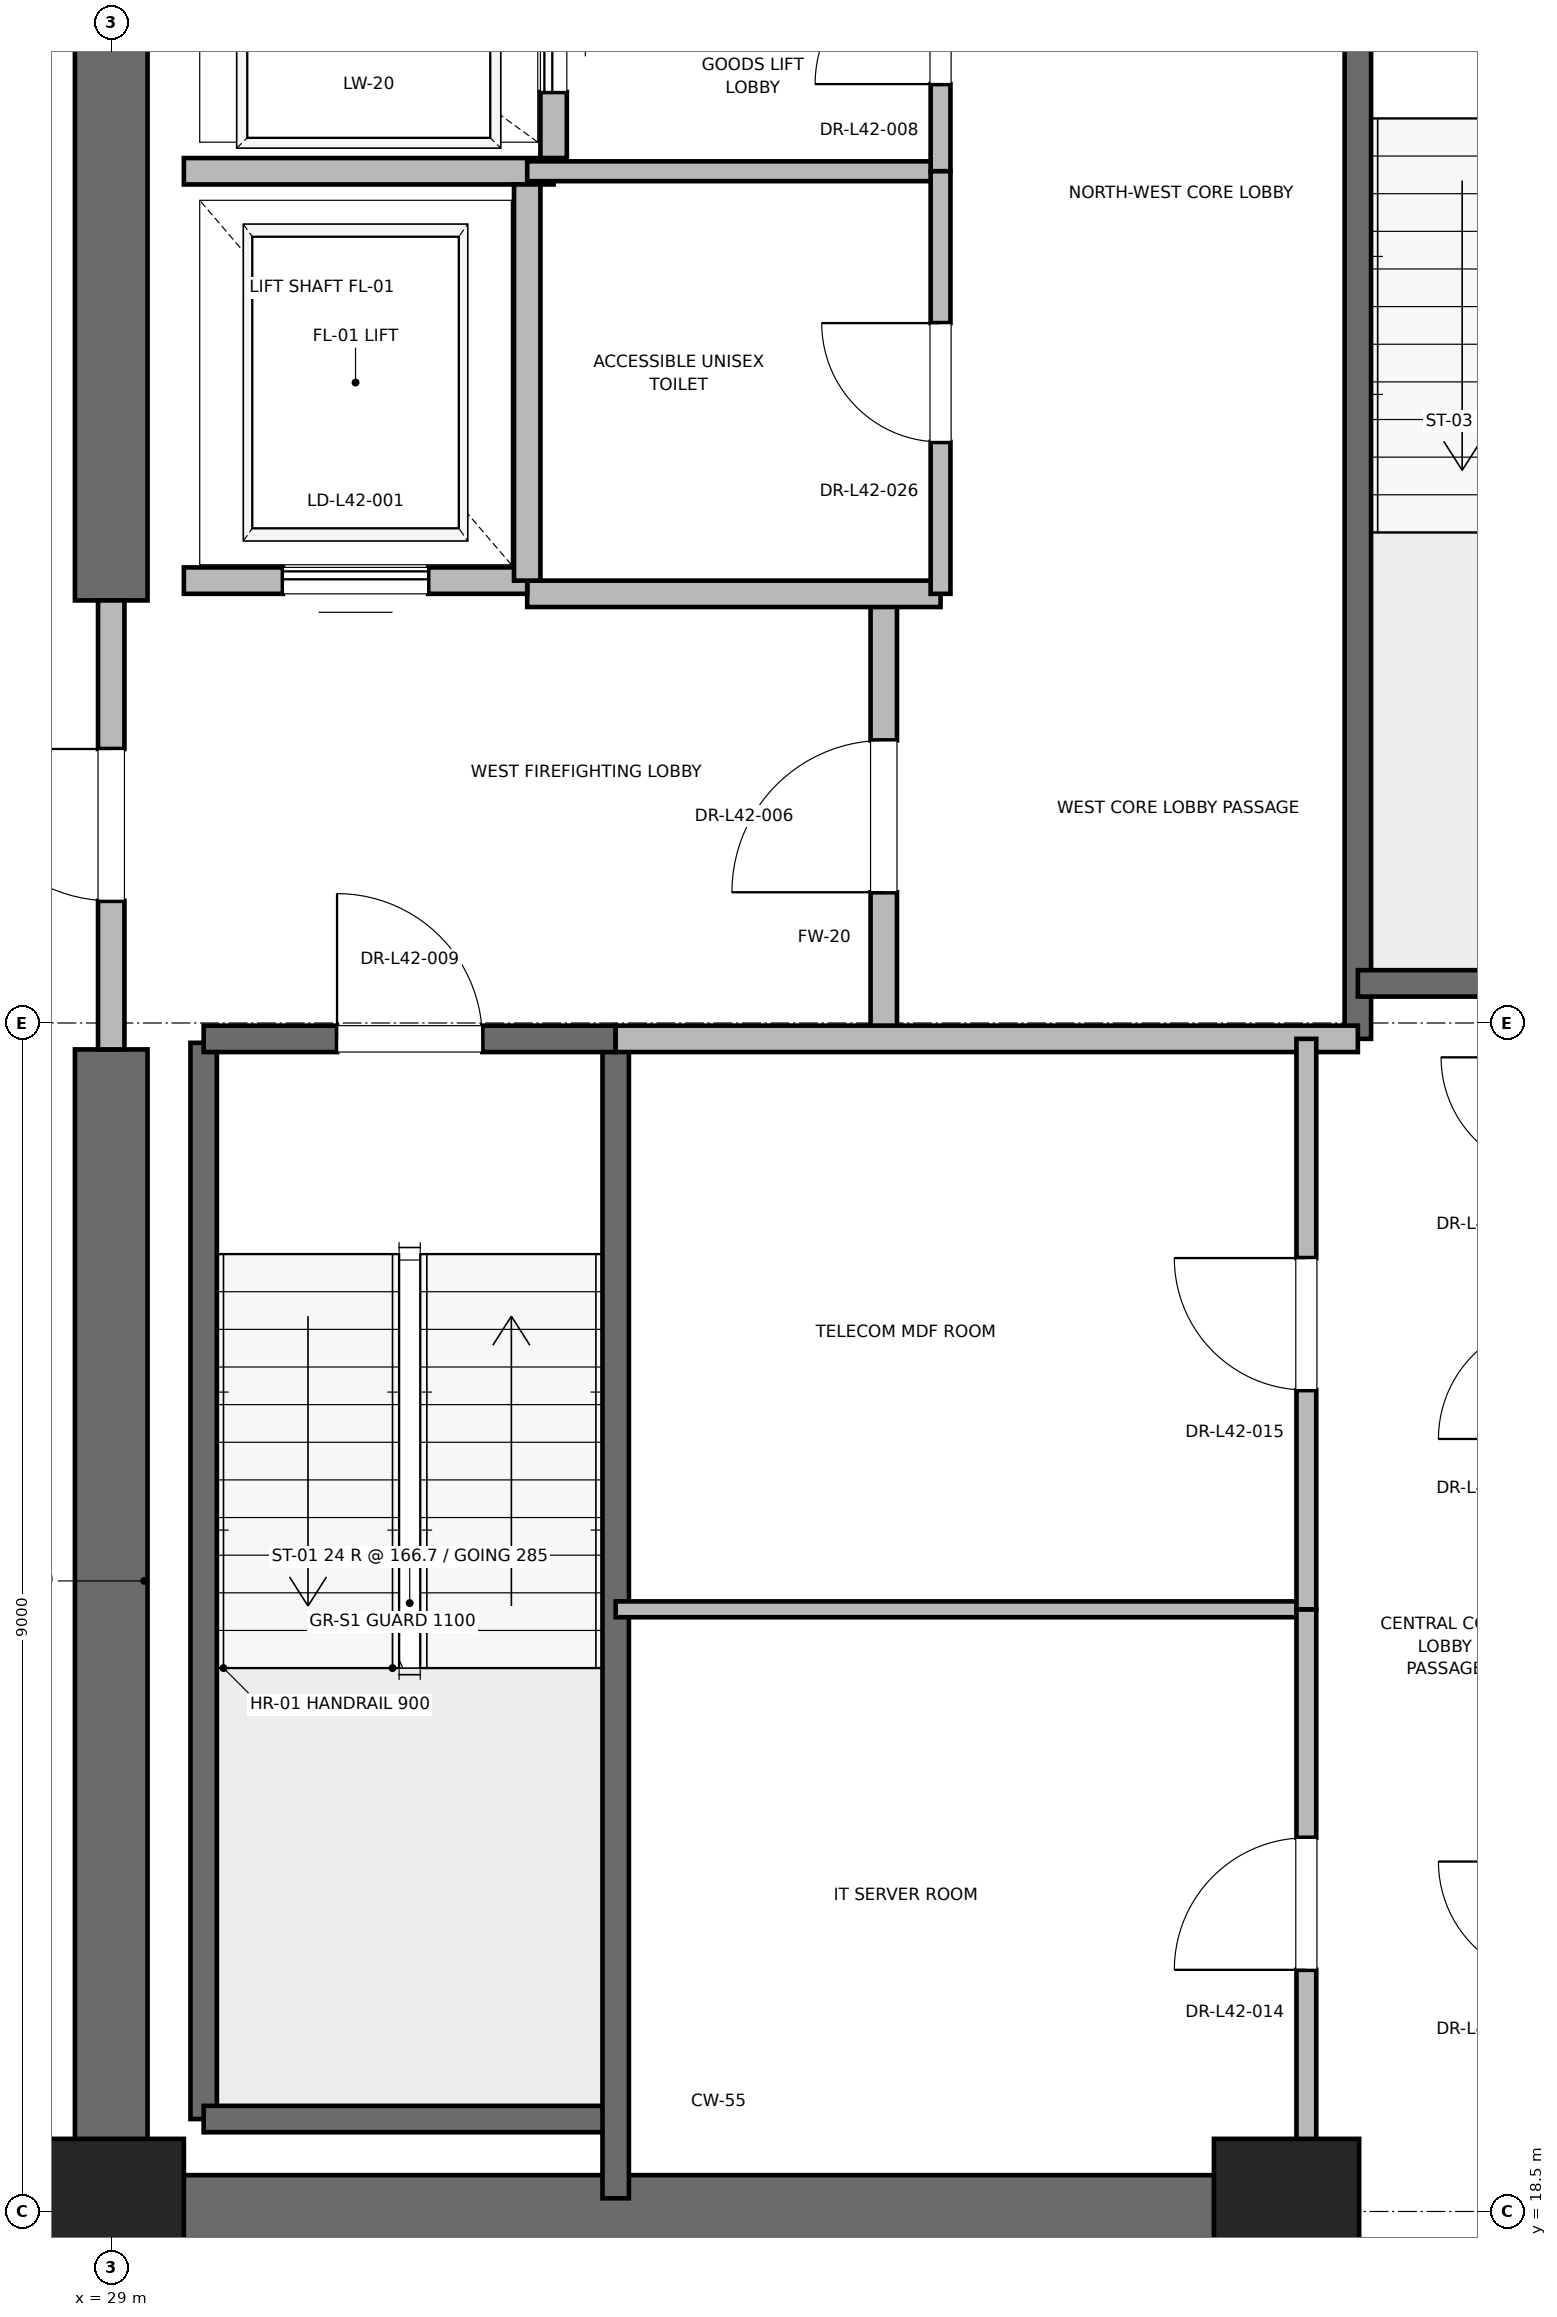
"""IFC4 building model, lengths in metres.
Left out: names, types, materials, properties, quantities, classifications, styles, units other than length and angle.
Written with IfcOpenShell. Run it as: python <this file> out.ifc"""

import sys

from ifc_helpers import new_model, si_unit, direction, frame, frame_2d, origin, origin_2d, place, context, subcontext, project, spatial, rectangle, extrude, element, fill, save


model = new_model("IFC4")
c1 = context("Model", 3, precision=1e-05, world=origin(), true_north=direction((0.0, 1.0)))
c2 = subcontext(c1, "Body", "Model", "MODEL_VIEW")
j1 = project(units=[si_unit("LENGTHUNIT", "METRE"), si_unit("PLANEANGLEUNIT", "RADIAN")], contexts=[c1])
p1 = place(None, origin())
s1 = spatial("IfcSite", under=j1, at=p1, CompositionType="ELEMENT")
p2 = place(p1, origin())
s2 = spatial("IfcBuilding", under=s1, at=p2, CompositionType="ELEMENT")
p3 = place(p2, frame((0.0, 0.0, 180.4)))
s3 = spatial("IfcBuildingStorey", under=s2, at=p3, CompositionType="ELEMENT", Elevation=180.4)
for number, where, z_axis, x_axis in (
    (1, (29.0, 18.5, 0.0), (0.0, 0.0, 1.0), (1.0, 0.0, 0.0)),
    (2, (37.9, 18.5, 0.0), (0.0, 0.0, 1.0), (1.0, 0.0, 0.0)),
):
    element("IfcColumn", number, at=place(p3, frame(where, z_axis=z_axis, x_axis=x_axis)), inside=s3, PredefinedType="PILASTER", context=c2, shape_type="SweptSolid", body=[
        extrude(rectangle(XDim=1.1, YDim=1.1, at=origin_2d()), origin(), (0.0, 0.0, 1.0), 4.0),
    ])
p4 = place(p3, frame((29.0, 18.5, 0.0), z_axis=(0.0, 0.0, 1.0), x_axis=(1.0, 0.0, 0.0)))
e3 = element("IfcWall", 3, at=p4, inside=s3, PredefinedType="SHEAR", context=c2, shape_type="SweptSolid", body=[
    extrude(rectangle(XDim=9.2, YDim=0.55, at=frame_2d((4.6, 0.0))), origin(), (0.0, 0.0, 1.0), 3.7),
])
p5 = place(p3, frame((29.0, 18.5, 0.0), z_axis=(0.0, 0.0, 1.0), x_axis=(0.0, 1.0, 0.0)))
e4 = element("IfcWall", 4, at=p5, inside=s3, PredefinedType="SHEAR", context=c2, shape_type="SweptSolid", body=[
    extrude(rectangle(XDim=8.8, YDim=0.55, at=frame_2d((4.4, 0.0))), origin(), (0.0, 0.0, 1.0), 3.7),
])
p6 = place(p3, frame((29.0, 30.7, 0.0), z_axis=(0.0, 0.0, 1.0), x_axis=(0.0, 1.0, 0.0)))
e5 = element("IfcWall", 5, at=p6, inside=s3, PredefinedType="SHEAR", context=c2, shape_type="SweptSolid", body=[
    extrude(rectangle(XDim=5.8, YDim=0.55, at=frame_2d((2.9, 0.0))), origin(), (0.0, 0.0, 1.0), 3.7),
])
p7 = place(p3, frame((29.7, 19.2, 0.0), z_axis=(0.0, 0.0, 1.0), x_axis=(0.0, 1.0, 0.0)))
e6 = element("IfcWall", 6, at=p7, inside=s3, PredefinedType="SOLIDWALL", context=c2, shape_type="SweptSolid", body=[
    extrude(rectangle(XDim=8.15, YDim=0.2, at=frame_2d((4.075, 0.0))), origin(), (0.0, 0.0, 1.0), 3.7),
])
p8 = place(p3, frame((29.7, 19.2, 0.0), z_axis=(0.0, 0.0, 1.0), x_axis=(1.0, 0.0, 0.0)))
e7 = element("IfcWall", 7, at=p8, inside=s3, PredefinedType="SOLIDWALL", context=c2, shape_type="SweptSolid", body=[
    extrude(rectangle(XDim=3.12, YDim=0.2, at=frame_2d((1.56, 0.0))), origin(), (0.0, 0.0, 1.0), 3.7),
])
p9 = place(p3, frame((32.82, 18.6, 0.0), z_axis=(0.0, 0.0, 1.0), x_axis=(0.0, 1.0, 0.0)))
e8 = element("IfcWall", 8, at=p9, inside=s3, PredefinedType="SOLIDWALL", context=c2, shape_type="SweptSolid", body=[
    extrude(rectangle(XDim=8.78, YDim=0.2, at=frame_2d((4.39, 0.0))), origin(), (0.0, 0.0, 1.0), 3.7),
])
p10 = place(p3, frame((29.7, 27.38, 0.0), z_axis=(0.0, 0.0, 1.0), x_axis=(1.0, 0.0, 0.0)))
e9 = element("IfcWall", 9, at=p10, inside=s3, PredefinedType="SOLIDWALL", context=c2, shape_type="SweptSolid", body=[
    extrude(rectangle(XDim=3.12, YDim=0.2, at=frame_2d((1.56, 0.0))), origin(), (0.0, 0.0, 1.0), 3.7),
])
p11 = place(p10, frame((1.01, 0.0, 0.0)))
e10 = element("IfcOpeningElement", 10, at=p11, cuts=e9, PredefinedType="OPENING", context=c2, shape_type="SweptSolid", body=[
    extrude(rectangle(XDim=1.1, YDim=2.15, at=frame_2d((0.55, 1.075))), frame((0.0, 0.1, 0.0), z_axis=(0.0, -1.0, 0.0), x_axis=(1.0, 0.0, 0.0)), (0.0, 0.0, 1.0), 0.2),
])
p12 = place(p3, frame((38.44, 27.38, 0.0), z_axis=(0.0, 0.0, 1.0), x_axis=(0.0, 1.0, 0.0)))
e11 = element("IfcWall", 11, at=p12, inside=s3, PredefinedType="SOLIDWALL", context=c2, shape_type="SweptSolid", body=[
    extrude(rectangle(XDim=8.87, YDim=0.2, at=frame_2d((4.435, 0.0))), origin(), (0.0, 0.0, 1.0), 3.7),
])
p13 = place(p3, frame((38.44, 27.8, 0.0), z_axis=(0.0, 0.0, 1.0), x_axis=(1.0, 0.0, 0.0)))
e12 = element("IfcWall", 12, at=p13, inside=s3, PredefinedType="SOLIDWALL", context=c2, shape_type="SweptSolid", body=[
    extrude(rectangle(XDim=3.32, YDim=0.2, at=frame_2d((1.66, 0.0))), origin(), (0.0, 0.0, 1.0), 3.7),
])
p14 = place(p3, frame((34.85, 27.38, 0.0), z_axis=(0.0, 0.0, 1.0), x_axis=(0.0, 1.0, 0.0)))
e13 = element("IfcWall", 13, at=p14, inside=s3, PredefinedType="PARTITIONING", context=c2, shape_type="SweptSolid", body=[
    extrude(rectangle(XDim=3.37, YDim=0.2, at=frame_2d((1.685, 0.0))), origin(), (0.0, 0.0, 1.0), 3.7),
])
p15 = place(p14, frame((1.11, 0.0, 0.0)))
e14 = element("IfcOpeningElement", 14, at=p15, cuts=e13, PredefinedType="OPENING", context=c2, shape_type="SweptSolid", body=[
    extrude(rectangle(XDim=1.15, YDim=2.2, at=frame_2d((0.575, 1.1))), frame((0.0, 0.1, 0.0), z_axis=(0.0, -1.0, 0.0), x_axis=(1.0, 0.0, 0.0)), (0.0, 0.0, 1.0), 0.2),
])
p16 = place(p3, frame((29.0, 27.3, 0.0), z_axis=(0.0, 0.0, 1.0), x_axis=(0.0, 1.0, 0.0)))
e15 = element("IfcWall", 15, at=p16, inside=s3, PredefinedType="PARTITIONING", context=c2, shape_type="SweptSolid", body=[
    extrude(rectangle(XDim=3.4, YDim=0.2, at=frame_2d((1.7, 0.0))), origin(), (0.0, 0.0, 1.0), 2.68),
])
p17 = place(p16, frame((1.125, 0.0, 0.0)))
e16 = element("IfcOpeningElement", 16, at=p17, cuts=e15, PredefinedType="OPENING", context=c2, shape_type="SweptSolid", body=[
    extrude(rectangle(XDim=1.15, YDim=2.2, at=frame_2d((0.575, 1.1))), frame((0.0, 0.1, 0.0), z_axis=(0.0, -1.0, 0.0), x_axis=(1.0, 0.0, 0.0)), (0.0, 0.0, 1.0), 0.2),
])
p18 = place(p3, frame((32.82, 27.38, 0.0), z_axis=(0.0, 0.0, 1.0), x_axis=(1.0, 0.0, 0.0)))
e17 = element("IfcWall", 17, at=p18, inside=s3, PredefinedType="PARTITIONING", context=c2, shape_type="SweptSolid", body=[
    extrude(rectangle(XDim=5.62, YDim=0.2, at=frame_2d((2.81, 0.0))), origin(), (0.0, 0.0, 1.0), 3.7),
])
p19 = place(p3, frame((32.15, 30.75, 0.0), z_axis=(0.0, 0.0, 1.0), x_axis=(1.0, 0.0, 0.0)))
e18 = element("IfcWall", 18, at=p19, inside=s3, PredefinedType="PARTITIONING", context=c2, shape_type="SweptSolid", body=[
    extrude(rectangle(XDim=3.13, YDim=0.2, at=frame_2d((1.565, 0.0))), origin(), (0.0, 0.0, 1.0), 3.7),
])
p20 = place(p3, frame((29.55, 30.85, 0.0), z_axis=(0.0, 0.0, 1.0), x_axis=(1.0, 0.0, 0.0)))
e19 = element("IfcWall", 19, at=p20, inside=s3, PredefinedType="SOLIDWALL", context=c2, shape_type="SweptSolid", body=[
    extrude(rectangle(XDim=2.6, YDim=0.2, at=frame_2d((1.3, 0.0))), origin(), (0.0, 0.0, 1.0), 2.68),
])
p21 = place(p20, frame((0.75, 0.0, 0.0)))
e20 = element("IfcOpeningElement", 20, at=p21, cuts=e19, PredefinedType="OPENING", context=c2, shape_type="SweptSolid", body=[
    extrude(rectangle(XDim=1.1, YDim=2.2, at=frame_2d((0.55, 1.1))), frame((0.0, 0.1, 0.0), z_axis=(0.0, -1.0, 0.0), x_axis=(1.0, 0.0, 0.0)), (0.0, 0.0, 1.0), 0.2),
])
p22 = place(p3, frame((29.55, 33.95, 0.0), z_axis=(0.0, 0.0, 1.0), x_axis=(1.0, 0.0, 0.0)))
e21 = element("IfcWall", 21, at=p22, inside=s3, PredefinedType="SOLIDWALL", context=c2, shape_type="SweptSolid", body=[
    extrude(rectangle(XDim=2.8, YDim=0.2, at=frame_2d((1.4, 0.0))), origin(), (0.0, 0.0, 1.0), 3.7),
])
p23 = place(p3, frame((32.15, 30.85, 0.0), z_axis=(0.0, 0.0, 1.0), x_axis=(0.0, 1.0, 0.0)))
e22 = element("IfcWall", 22, at=p23, inside=s3, PredefinedType="SOLIDWALL", context=c2, shape_type="SweptSolid", body=[
    extrude(rectangle(XDim=3.0, YDim=0.2, at=frame_2d((1.5, 0.0))), origin(), (0.0, 0.0, 1.0), 3.7),
])
p24 = place(p3, frame((32.35, 34.05, 0.0), z_axis=(0.0, 0.0, 1.0), x_axis=(0.0, 1.0, 0.0)))
e23 = element("IfcWall", 23, at=p24, inside=s3, PredefinedType="SOLIDWALL", context=c2, shape_type="SweptSolid", body=[
    extrude(rectangle(XDim=2.1, YDim=0.2, at=frame_2d((1.05, 0.0))), origin(), (0.0, 0.0, 1.0), 3.7),
])
p25 = place(p24, frame((0.5, 0.0, 0.0)))
e24 = element("IfcOpeningElement", 24, at=p25, cuts=e23, PredefinedType="OPENING", context=c2, shape_type="SweptSolid", body=[
    extrude(rectangle(XDim=1.1, YDim=2.2, at=frame_2d((0.55, 1.1))), frame((0.0, 0.1, 0.0), z_axis=(0.0, -1.0, 0.0), x_axis=(1.0, 0.0, 0.0)), (0.0, 0.0, 1.0), 0.2),
])
p26 = place(p3, frame((32.15, 33.95, 0.0), z_axis=(0.0, 0.0, 1.0), x_axis=(1.0, 0.0, 0.0)))
e25 = element("IfcWall", 25, at=p26, inside=s3, PredefinedType="PARTITIONING", context=c2, shape_type="SweptSolid", body=[
    extrude(rectangle(XDim=3.13, YDim=0.15, at=frame_2d((1.565, 0.0))), origin(), (0.0, 0.0, 1.0), 2.85),
])
p27 = place(p3, frame((35.28, 33.95, 0.0), z_axis=(0.0, 0.0, 1.0), x_axis=(0.0, 1.0, 0.0)))
e26 = element("IfcWall", 26, at=p27, inside=s3, PredefinedType="PARTITIONING", context=c2, shape_type="SweptSolid", body=[
    extrude(rectangle(XDim=2.27, YDim=0.15, at=frame_2d((1.135, 0.0))), origin(), (0.0, 0.0, 1.0), 2.68),
])
p28 = place(p27, frame((0.66, 0.0, 0.0)))
e27 = element("IfcOpeningElement", 27, at=p28, cuts=e26, PredefinedType="OPENING", context=c2, shape_type="SweptSolid", body=[
    extrude(rectangle(XDim=0.95, YDim=2.15, at=frame_2d((0.475, 1.075))), frame((0.0, 0.075, 0.0), z_axis=(0.0, -1.0, 0.0), x_axis=(1.0, 0.0, 0.0)), (0.0, 0.0, 1.0), 0.15),
])
p29 = place(p3, frame((35.28, 30.75, 0.0), z_axis=(0.0, 0.0, 1.0), x_axis=(0.0, 1.0, 0.0)))
e28 = element("IfcWall", 28, at=p29, inside=s3, PredefinedType="PARTITIONING", context=c2, shape_type="SweptSolid", body=[
    extrude(rectangle(XDim=3.2, YDim=0.15, at=frame_2d((1.6, 0.0))), origin(), (0.0, 0.0, 1.0), 2.85),
])
p30 = place(p29, frame((1.15, 0.0, 0.0)))
e29 = element("IfcOpeningElement", 29, at=p30, cuts=e28, PredefinedType="OPENING", context=c2, shape_type="SweptSolid", body=[
    extrude(rectangle(XDim=0.9, YDim=2.1, at=frame_2d((0.45, 1.05))), frame((0.0, 0.075, 0.0), z_axis=(0.0, -1.0, 0.0), x_axis=(1.0, 0.0, 0.0)), (0.0, 0.0, 1.0), 0.15),
])
p31 = place(p3, frame((32.82, 23.06, 0.0), z_axis=(0.0, 0.0, 1.0), x_axis=(1.0, 0.0, 0.0)))
e30 = element("IfcWall", 30, at=p31, inside=s3, PredefinedType="PARTITIONING", context=c2, shape_type="SweptSolid", body=[
    extrude(rectangle(XDim=5.23, YDim=0.12, at=frame_2d((2.615, 0.0))), origin(), (0.0, 0.0, 1.0), 2.85),
])
p32 = place(p3, frame((38.05, 18.6, 0.0), z_axis=(0.0, 0.0, 1.0), x_axis=(0.0, 1.0, 0.0)))
e31 = element("IfcWall", 31, at=p32, inside=s3, PredefinedType="PARTITIONING", context=c2, shape_type="SweptSolid", body=[
    extrude(rectangle(XDim=4.46, YDim=0.15, at=frame_2d((2.23, 0.0))), origin(), (0.0, 0.0, 1.0), 2.68),
])
p33 = place(p32, frame((1.73, 0.0, 0.0)))
e32 = element("IfcOpeningElement", 32, at=p33, cuts=e31, PredefinedType="OPENING", context=c2, shape_type="SweptSolid", body=[
    extrude(rectangle(XDim=1.0, YDim=2.15, at=frame_2d((0.5, 1.075))), frame((0.0, 0.075, 0.0), z_axis=(0.0, -1.0, 0.0), x_axis=(1.0, 0.0, 0.0)), (0.0, 0.0, 1.0), 0.15),
])
p34 = place(p3, frame((38.05, 23.06, 0.0), z_axis=(0.0, 0.0, 1.0), x_axis=(0.0, 1.0, 0.0)))
e33 = element("IfcWall", 33, at=p34, inside=s3, PredefinedType="PARTITIONING", context=c2, shape_type="SweptSolid", body=[
    extrude(rectangle(XDim=4.32, YDim=0.15, at=frame_2d((2.16, 0.0))), origin(), (0.0, 0.0, 1.0), 2.85),
])
p35 = place(p34, frame((1.66, 0.0, 0.0)))
e34 = element("IfcOpeningElement", 34, at=p35, cuts=e33, PredefinedType="OPENING", context=c2, shape_type="SweptSolid", body=[
    extrude(rectangle(XDim=1.0, YDim=2.15, at=frame_2d((0.5, 1.075))), frame((0.0, 0.075, 0.0), z_axis=(0.0, -1.0, 0.0), x_axis=(1.0, 0.0, 0.0)), (0.0, 0.0, 1.0), 0.15),
])
p36 = place(p11, origin())
e35 = element("IfcDoor", 35, at=p36, inside=s3, OperationType="SINGLE_SWING_LEFT", PredefinedType="DOOR", context=c2, shape_type="SweptSolid", body=[
    extrude(rectangle(XDim=1.1, YDim=2.15, at=frame_2d((0.55, 1.075))), frame((0.0, 0.025, 0.0), z_axis=(0.0, -1.0, 0.0), x_axis=(1.0, 0.0, 0.0)), (0.0, 0.0, 1.0), 0.05),
])
fill(e10, e35)
p37 = place(p15, origin())
e36 = element("IfcDoor", 36, at=p37, inside=s3, OperationType="SINGLE_SWING_LEFT", PredefinedType="DOOR", context=c2, shape_type="SweptSolid", body=[
    extrude(rectangle(XDim=1.15, YDim=2.2, at=frame_2d((0.575, 1.1))), frame((0.0, 0.025, 0.0), z_axis=(0.0, -1.0, 0.0), x_axis=(1.0, 0.0, 0.0)), (0.0, 0.0, 1.0), 0.05),
])
fill(e14, e36)
p38 = place(p17, origin())
e37 = element("IfcDoor", 37, at=p38, inside=s3, OperationType="SINGLE_SWING_RIGHT", PredefinedType="DOOR", context=c2, shape_type="SweptSolid", body=[
    extrude(rectangle(XDim=1.15, YDim=2.2, at=frame_2d((0.575, 1.1))), frame((0.0, 0.025, 0.0), z_axis=(0.0, -1.0, 0.0), x_axis=(1.0, 0.0, 0.0)), (0.0, 0.0, 1.0), 0.05),
])
fill(e16, e37)
p39 = place(p21, origin())
e38 = element("IfcDoor", 38, at=p39, inside=s3, OperationType="SLIDING_TO_RIGHT", PredefinedType="DOOR", context=c2, shape_type="SweptSolid", body=[
    extrude(rectangle(XDim=1.1, YDim=2.2, at=frame_2d((0.55, 1.1))), frame((0.0, 0.025, 0.0), z_axis=(0.0, -1.0, 0.0), x_axis=(1.0, 0.0, 0.0)), (0.0, 0.0, 1.0), 0.05),
])
fill(e20, e38)
p40 = place(p25, origin())
e39 = element("IfcDoor", 39, at=p40, inside=s3, OperationType="SLIDING_TO_RIGHT", PredefinedType="DOOR", context=c2, shape_type="SweptSolid", body=[
    extrude(rectangle(XDim=1.1, YDim=2.2, at=frame_2d((0.55, 1.1))), frame((0.0, 0.025, 0.0), z_axis=(0.0, -1.0, 0.0), x_axis=(1.0, 0.0, 0.0)), (0.0, 0.0, 1.0), 0.05),
])
fill(e24, e39)
p41 = place(p28, origin())
e40 = element("IfcDoor", 40, at=p41, inside=s3, OperationType="SINGLE_SWING_LEFT", PredefinedType="DOOR", context=c2, shape_type="SweptSolid", body=[
    extrude(rectangle(XDim=0.95, YDim=2.15, at=frame_2d((0.475, 1.075))), frame((0.0, 0.025, 0.0), z_axis=(0.0, -1.0, 0.0), x_axis=(1.0, 0.0, 0.0)), (0.0, 0.0, 1.0), 0.05),
])
fill(e27, e40)
p42 = place(p30, origin())
e41 = element("IfcDoor", 41, at=p42, inside=s3, OperationType="SINGLE_SWING_RIGHT", PredefinedType="DOOR", context=c2, shape_type="SweptSolid", body=[
    extrude(rectangle(XDim=0.9, YDim=2.1, at=frame_2d((0.45, 1.05))), frame((0.0, 0.025, 0.0), z_axis=(0.0, -1.0, 0.0), x_axis=(1.0, 0.0, 0.0)), (0.0, 0.0, 1.0), 0.05),
])
fill(e29, e41)
p43 = place(p33, origin())
e42 = element("IfcDoor", 42, at=p43, inside=s3, OperationType="SINGLE_SWING_LEFT", PredefinedType="DOOR", context=c2, shape_type="SweptSolid", body=[
    extrude(rectangle(XDim=1.0, YDim=2.15, at=frame_2d((0.5, 1.075))), frame((0.0, 0.025, 0.0), z_axis=(0.0, -1.0, 0.0), x_axis=(1.0, 0.0, 0.0)), (0.0, 0.0, 1.0), 0.05),
])
fill(e32, e42)
p44 = place(p35, origin())
e43 = element("IfcDoor", 43, at=p44, inside=s3, OperationType="SINGLE_SWING_RIGHT", PredefinedType="DOOR", context=c2, shape_type="SweptSolid", body=[
    extrude(rectangle(XDim=1.0, YDim=2.15, at=frame_2d((0.5, 1.075))), frame((0.0, 0.025, 0.0), z_axis=(0.0, -1.0, 0.0), x_axis=(1.0, 0.0, 0.0)), (0.0, 0.0, 1.0), 0.05),
])
fill(e34, e43)
save(model, sys.argv[1])
